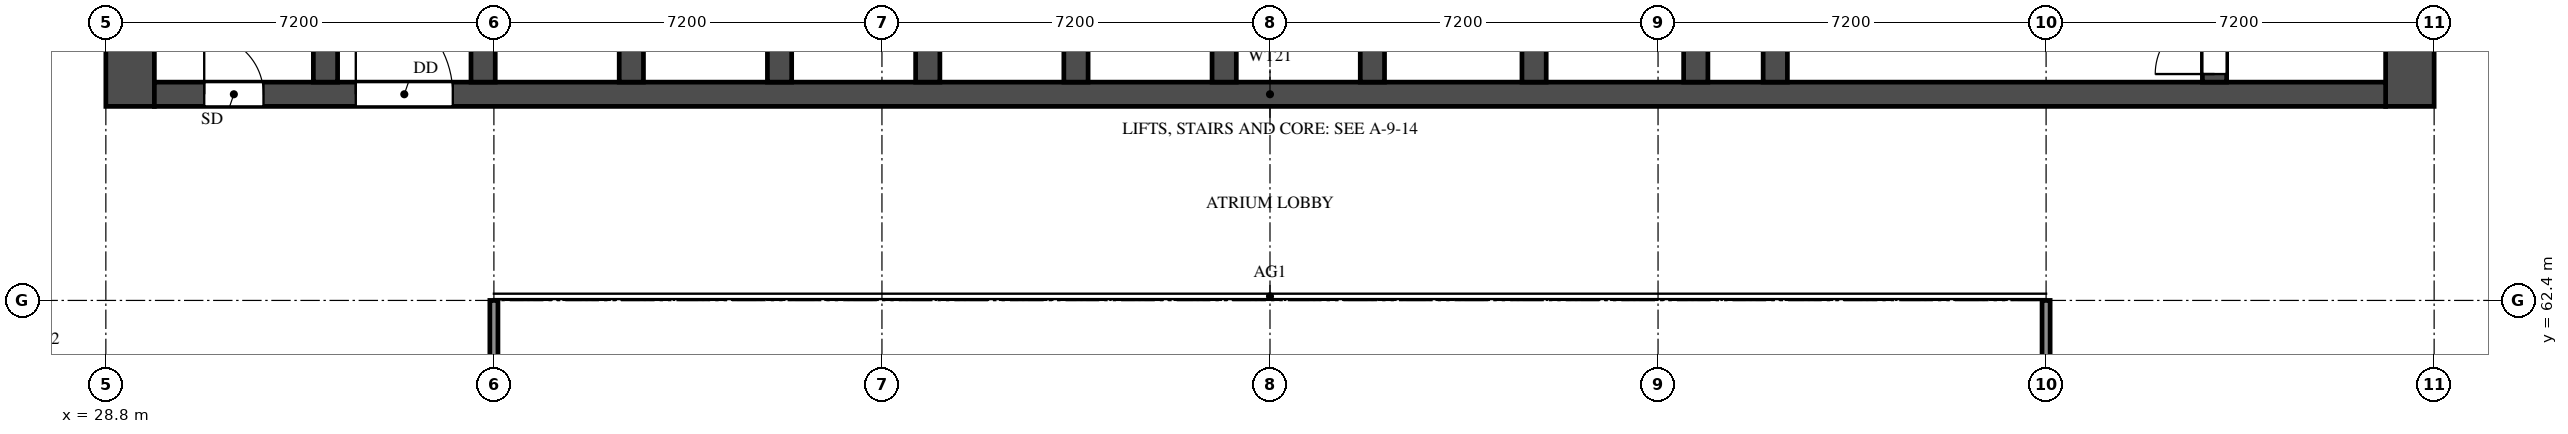
"""IFC4 building model, lengths in metres.
Left out: names, types, materials, properties, quantities, classifications, styles, units other than length and angle.
Written with IfcOpenShell. Run it as: python <this file> out.ifc"""

import sys

from ifc_helpers import new_model, si_unit, direction, frame, frame_2d, origin, place, context, subcontext, project, spatial, rectangle, extrude, element, fill, save


model = new_model("IFC4")
c1 = context("Model", 3, precision=1e-05, world=origin(), true_north=direction((0.0, 1.0)))
c2 = subcontext(c1, "Body", "Model", "MODEL_VIEW")
j1 = project(units=[si_unit("LENGTHUNIT", "METRE"), si_unit("PLANEANGLEUNIT", "RADIAN")], contexts=[c1])
p1 = place(None, origin())
s1 = spatial("IfcSite", under=j1, at=p1, CompositionType="ELEMENT")
p2 = place(p1, origin())
s2 = spatial("IfcBuilding", under=s1, at=p2, CompositionType="ELEMENT")
p3 = place(p2, frame((0.0, 0.0, 93.5)))
s3 = spatial("IfcBuildingStorey", under=s2, at=p3, CompositionType="ELEMENT", Elevation=93.5)
for number, where, z_axis, x_axis in (
    (1, (29.25, 66.0, 0.0), (0.0, 0.0, 1.0), (0.0, 1.0, 0.0)),
    (2, (71.55, 66.0, 0.0), (0.0, 0.0, 1.0), (0.0, 1.0, 0.0)),
):
    element("IfcWall", number, at=place(p3, frame(where, z_axis=z_axis, x_axis=x_axis)), inside=s3, PredefinedType="SHEAR", context=c2, shape_type="SweptSolid", body=[
        extrude(rectangle(XDim=12.0, YDim=0.9, at=frame_2d((6.0, 0.0))), origin(), (0.0, 0.0, 1.0), 3.18),
    ])
p4 = place(p3, frame((29.7, 66.225, 0.0), z_axis=(0.0, 0.0, 1.0), x_axis=(1.0, 0.0, 0.0)))
e3 = element("IfcWall", 3, at=p4, inside=s3, PredefinedType="SHEAR", context=c2, shape_type="SweptSolid", body=[
    extrude(rectangle(XDim=41.4, YDim=0.45, at=frame_2d((20.7, 0.0))), origin(), (0.0, 0.0, 1.0), 3.18),
])
p5 = place(p4, frame((0.925, 0.0, 0.0)))
e4 = element("IfcOpeningElement", 4, at=p5, cuts=e3, PredefinedType="OPENING", context=c2, shape_type="SweptSolid", body=[
    extrude(rectangle(XDim=1.1, YDim=2.1, at=frame_2d((0.55, 1.05))), frame((0.0, 0.235, 0.0), z_axis=(0.0, -1.0, 0.0), x_axis=(1.0, 0.0, 0.0)), (0.0, 0.0, 1.0), 0.47),
])
p6 = place(p4, frame((3.738, 0.0, 0.0)))
e5 = element("IfcOpeningElement", 5, at=p6, cuts=e3, PredefinedType="OPENING", context=c2, shape_type="SweptSolid", body=[
    extrude(rectangle(XDim=1.8, YDim=2.1, at=frame_2d((0.9, 1.05))), frame((0.0, 0.235, 0.0), z_axis=(0.0, -1.0, 0.0), x_axis=(1.0, 0.0, 0.0)), (0.0, 0.0, 1.0), 0.47),
])
p7 = place(p3, frame((32.875, 66.45, 0.0), z_axis=(0.0, 0.0, 1.0), x_axis=(0.0, 1.0, 0.0)))
e6 = element("IfcWall", 6, at=p7, inside=s3, PredefinedType="SHEAR", context=c2, shape_type="SweptSolid", body=[
    extrude(rectangle(XDim=10.65, YDim=0.45, at=frame_2d((5.325, 0.0))), origin(), (0.0, 0.0, 1.0), 3.18),
])
p8 = place(p3, frame((67.925, 66.45, 0.0), z_axis=(0.0, 0.0, 1.0), x_axis=(0.0, 1.0, 0.0)))
e7 = element("IfcWall", 7, at=p8, inside=s3, PredefinedType="SHEAR", context=c2, shape_type="SweptSolid", body=[
    extrude(rectangle(XDim=10.65, YDim=0.45, at=frame_2d((5.325, 0.0))), origin(), (0.0, 0.0, 1.0), 3.18),
])
p9 = place(p8, frame((0.15, 0.0, 0.0)))
e8 = element("IfcOpeningElement", 8, at=p9, cuts=e7, PredefinedType="OPENING", context=c2, shape_type="SweptSolid", body=[
    extrude(rectangle(XDim=1.1, YDim=2.1, at=frame_2d((0.55, 1.05))), frame((0.0, 0.235, 0.0), z_axis=(0.0, -1.0, 0.0), x_axis=(1.0, 0.0, 0.0)), (0.0, 0.0, 1.0), 0.47),
])
p10 = place(p3, frame((59.775, 66.45, 0.0), z_axis=(0.0, 0.0, 1.0), x_axis=(0.0, 1.0, 0.0)))
e9 = element("IfcWall", 9, at=p10, inside=s3, PredefinedType="SHEAR", context=c2, shape_type="SweptSolid", body=[
    extrude(rectangle(XDim=6.025, YDim=0.45, at=frame_2d((3.013, 0.0))), origin(), (0.0, 0.0, 1.0), 3.18),
])
p11 = place(p10, frame((3.85, 0.0, 0.0)))
e10 = element("IfcOpeningElement", 10, at=p11, cuts=e9, PredefinedType="OPENING", context=c2, shape_type="SweptSolid", body=[
    extrude(rectangle(XDim=1.2, YDim=2.1, at=frame_2d((0.6, 1.05))), frame((0.0, 0.235, 0.0), z_axis=(0.0, -1.0, 0.0), x_axis=(1.0, 0.0, 0.0)), (0.0, 0.0, 1.0), 0.47),
])
for number, where, z_axis, x_axis in (
    (11, (35.8, 66.45, 0.0), (0.0, 0.0, 1.0), (0.0, 1.0, 0.0)),
    (12, (38.55, 66.45, 0.0), (0.0, 0.0, 1.0), (0.0, 1.0, 0.0)),
    (13, (41.3, 66.45, 0.0), (0.0, 0.0, 1.0), (0.0, 1.0, 0.0)),
    (14, (44.05, 66.45, 0.0), (0.0, 0.0, 1.0), (0.0, 1.0, 0.0)),
    (15, (46.8, 66.45, 0.0), (0.0, 0.0, 1.0), (0.0, 1.0, 0.0)),
    (16, (49.55, 66.45, 0.0), (0.0, 0.0, 1.0), (0.0, 1.0, 0.0)),
    (17, (52.3, 66.45, 0.0), (0.0, 0.0, 1.0), (0.0, 1.0, 0.0)),
    (18, (55.3, 66.45, 0.0), (0.0, 0.0, 1.0), (0.0, 1.0, 0.0)),
    (19, (58.3, 66.45, 0.0), (0.0, 0.0, 1.0), (0.0, 1.0, 0.0)),
):
    element("IfcWall", number, at=place(p3, frame(where, z_axis=z_axis, x_axis=x_axis)), inside=s3, PredefinedType="SHEAR", context=c2, shape_type="SweptSolid", body=[
        extrude(rectangle(XDim=2.425, YDim=0.45, at=frame_2d((1.212, 0.0))), origin(), (0.0, 0.0, 1.0), 3.18),
    ])
for number, where, z_axis, x_axis in (
    (20, (36.0, 48.0, 0.0), (0.0, 0.0, 1.0), (0.0, 1.0, 0.0)),
    (21, (64.8, 48.0, 0.0), (0.0, 0.0, 1.0), (0.0, 1.0, 0.0)),
):
    element("IfcWall", number, at=place(p3, frame(where, z_axis=z_axis, x_axis=x_axis)), inside=s3, PredefinedType="SOLIDWALL", context=c2, shape_type="SweptSolid", body=[
        extrude(rectangle(XDim=14.4, YDim=0.15, at=frame_2d((7.2, 0.0))), origin(), (0.0, 0.0, 1.0), 2.28),
    ])
p12 = place(p5, origin())
e22 = element("IfcDoor", 22, at=p12, inside=s3, OperationType="SINGLE_SWING_LEFT", PredefinedType="DOOR", context=c2, shape_type="SweptSolid", body=[
    extrude(rectangle(XDim=1.1, YDim=2.1, at=frame_2d((0.55, 1.05))), frame((0.0, 0.025, 0.0), z_axis=(0.0, -1.0, 0.0), x_axis=(1.0, 0.0, 0.0)), (0.0, 0.0, 1.0), 0.05),
])
fill(e4, e22)
p13 = place(p9, origin())
e23 = element("IfcDoor", 23, at=p13, inside=s3, OperationType="SINGLE_SWING_LEFT", PredefinedType="DOOR", context=c2, shape_type="SweptSolid", body=[
    extrude(rectangle(XDim=1.1, YDim=2.1, at=frame_2d((0.55, 1.05))), frame((0.0, 0.025, 0.0), z_axis=(0.0, -1.0, 0.0), x_axis=(1.0, 0.0, 0.0)), (0.0, 0.0, 1.0), 0.05),
])
fill(e8, e23)
p14 = place(p6, origin())
e24 = element("IfcDoor", 24, at=p14, inside=s3, OperationType="DOUBLE_DOOR_SINGLE_SWING", PredefinedType="DOOR", context=c2, shape_type="SweptSolid", body=[
    extrude(rectangle(XDim=1.8, YDim=2.1, at=frame_2d((0.9, 1.05))), frame((0.0, 0.025, 0.0), z_axis=(0.0, -1.0, 0.0), x_axis=(1.0, 0.0, 0.0)), (0.0, 0.0, 1.0), 0.05),
])
fill(e5, e24)
save(model, sys.argv[1])
